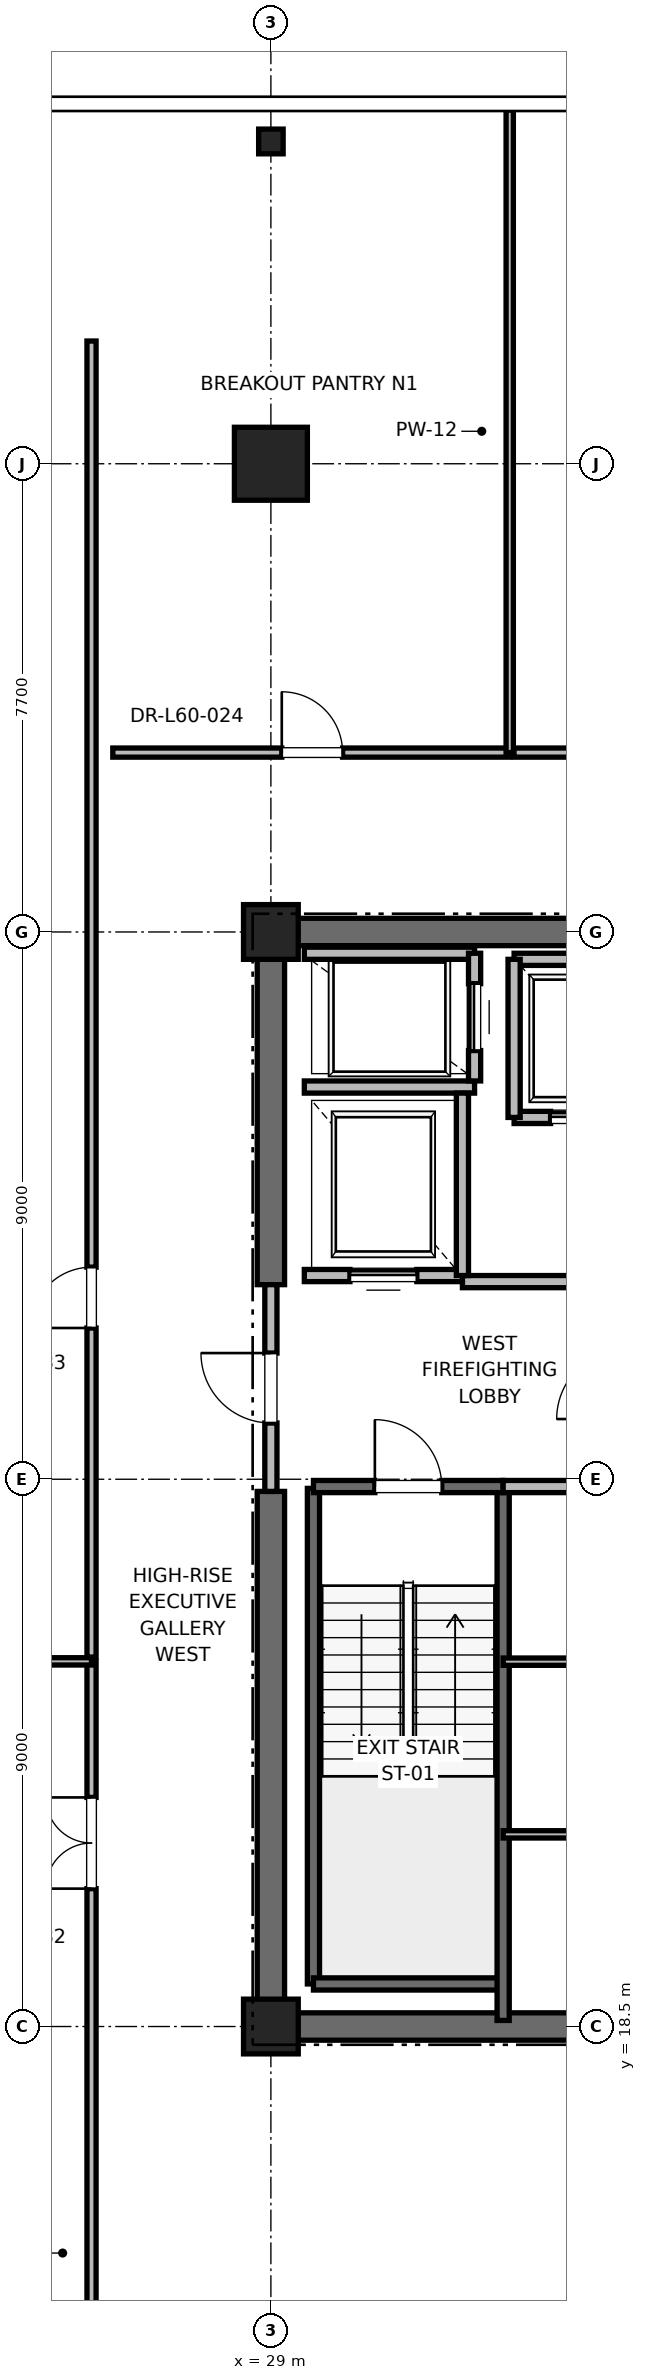
"""IFC4 building model, lengths in metres.
Left out: names, types, materials, properties, quantities, classifications, styles, units other than length and angle.
Written with IfcOpenShell. Run it as: python <this file> out.ifc"""

import sys

from ifc_helpers import new_model, si_unit, direction, frame, frame_2d, origin, origin_2d, place, context, subcontext, project, spatial, rectangle, i_section, extrude, element, fill, save


model = new_model("IFC4")
c1 = context("Model", 3, precision=1e-05, world=origin(), true_north=direction((0.0, 1.0)))
c2 = subcontext(c1, "Body", "Model", "MODEL_VIEW")
j1 = project(units=[si_unit("LENGTHUNIT", "METRE"), si_unit("PLANEANGLEUNIT", "RADIAN")], contexts=[c1])
p1 = place(None, origin())
s1 = spatial("IfcSite", under=j1, at=p1, CompositionType="ELEMENT")
p2 = place(p1, origin())
s2 = spatial("IfcBuilding", under=s1, at=p2, CompositionType="ELEMENT")
p3 = place(p2, frame((0.0, 0.0, 259.2)))
s3 = spatial("IfcBuildingStorey", under=s2, at=p3, CompositionType="ELEMENT", Elevation=259.2)
p4 = place(p3, frame((29.0, 44.2, 0.0), z_axis=(0.0, 0.0, 1.0), x_axis=(1.0, 0.0, 0.0)))
e1 = element("IfcColumn", 1, at=p4, inside=s3, PredefinedType="COLUMN", context=c2, shape_type="SweptSolid", body=[
    extrude(rectangle(XDim=1.2, YDim=1.2, at=origin_2d()), origin(), (0.0, 0.0, 1.0), 4.0),
])
p5 = place(p3, frame((29.0, 49.5, 0.0), z_axis=(0.0, 0.0, 1.0), x_axis=(1.0, 0.0, 0.0)))
e2 = element("IfcColumn", 2, at=p5, inside=s3, PredefinedType="COLUMN", context=c2, shape_type="SweptSolid", body=[
    extrude(i_section(OverallWidth=0.403, OverallDepth=0.406, WebThickness=0.027, FlangeThickness=0.043, FilletRadius=0.015, at=origin_2d()), origin(), (0.0, 0.0, 1.0), 4.0),
])
for number, where, z_axis, x_axis in (
    (3, (29.0, 18.5, 0.0), (0.0, 0.0, 1.0), (1.0, 0.0, 0.0)),
    (4, (29.0, 36.5, 0.0), (0.0, 0.0, 1.0), (1.0, 0.0, 0.0)),
):
    element("IfcColumn", number, at=place(p3, frame(where, z_axis=z_axis, x_axis=x_axis)), inside=s3, PredefinedType="PILASTER", context=c2, shape_type="SweptSolid", body=[
        extrude(rectangle(XDim=0.9, YDim=0.9, at=origin_2d()), origin(), (0.0, 0.0, 1.0), 4.0),
    ])
p6 = place(p3, frame((29.0, 18.5, 0.0), z_axis=(0.0, 0.0, 1.0), x_axis=(1.0, 0.0, 0.0)))
e5 = element("IfcWall", 5, at=p6, inside=s3, PredefinedType="SHEAR", context=c2, shape_type="SweptSolid", body=[
    extrude(rectangle(XDim=9.2, YDim=0.45, at=frame_2d((4.6, 0.0))), origin(), (0.0, 0.0, 1.0), 3.785),
])
p7 = place(p3, frame((29.0, 36.5, 0.0), z_axis=(0.0, 0.0, 1.0), x_axis=(1.0, 0.0, 0.0)))
e6 = element("IfcWall", 6, at=p7, inside=s3, PredefinedType="SHEAR", context=c2, shape_type="SweptSolid", body=[
    extrude(rectangle(XDim=5.8, YDim=0.45, at=frame_2d((2.9, 0.0))), origin(), (0.0, 0.0, 1.0), 3.785),
])
p8 = place(p3, frame((29.0, 18.5, 0.0), z_axis=(0.0, 0.0, 1.0), x_axis=(0.0, 1.0, 0.0)))
e7 = element("IfcWall", 7, at=p8, inside=s3, PredefinedType="SHEAR", context=c2, shape_type="SweptSolid", body=[
    extrude(rectangle(XDim=8.8, YDim=0.45, at=frame_2d((4.4, 0.0))), origin(), (0.0, 0.0, 1.0), 3.785),
])
p9 = place(p3, frame((29.0, 30.7, 0.0), z_axis=(0.0, 0.0, 1.0), x_axis=(0.0, 1.0, 0.0)))
e8 = element("IfcWall", 8, at=p9, inside=s3, PredefinedType="SHEAR", context=c2, shape_type="SweptSolid", body=[
    extrude(rectangle(XDim=5.8, YDim=0.45, at=frame_2d((2.9, 0.0))), origin(), (0.0, 0.0, 1.0), 3.785),
])
p10 = place(p3, frame((29.7, 19.2, 0.0), z_axis=(0.0, 0.0, 1.0), x_axis=(0.0, 1.0, 0.0)))
e9 = element("IfcWall", 9, at=p10, inside=s3, PredefinedType="SOLIDWALL", context=c2, shape_type="SweptSolid", body=[
    extrude(rectangle(XDim=8.15, YDim=0.2, at=frame_2d((4.075, 0.0))), origin(), (0.0, 0.0, 1.0), 3.785),
])
p11 = place(p3, frame((29.7, 19.2, 0.0), z_axis=(0.0, 0.0, 1.0), x_axis=(1.0, 0.0, 0.0)))
e10 = element("IfcWall", 10, at=p11, inside=s3, PredefinedType="SOLIDWALL", context=c2, shape_type="SweptSolid", body=[
    extrude(rectangle(XDim=3.12, YDim=0.2, at=frame_2d((1.56, 0.0))), origin(), (0.0, 0.0, 1.0), 3.785),
])
p12 = place(p3, frame((32.82, 18.6, 0.0), z_axis=(0.0, 0.0, 1.0), x_axis=(0.0, 1.0, 0.0)))
e11 = element("IfcWall", 11, at=p12, inside=s3, PredefinedType="SOLIDWALL", context=c2, shape_type="SweptSolid", body=[
    extrude(rectangle(XDim=8.78, YDim=0.2, at=frame_2d((4.39, 0.0))), origin(), (0.0, 0.0, 1.0), 3.785),
])
p13 = place(p3, frame((29.7, 27.38, 0.0), z_axis=(0.0, 0.0, 1.0), x_axis=(1.0, 0.0, 0.0)))
e12 = element("IfcWall", 12, at=p13, inside=s3, PredefinedType="SOLIDWALL", context=c2, shape_type="SweptSolid", body=[
    extrude(rectangle(XDim=3.12, YDim=0.2, at=frame_2d((1.56, 0.0))), origin(), (0.0, 0.0, 1.0), 3.785),
])
p14 = place(p13, frame((1.01, 0.0, 0.0)))
e13 = element("IfcOpeningElement", 13, at=p14, cuts=e12, PredefinedType="OPENING", context=c2, shape_type="SweptSolid", body=[
    extrude(rectangle(XDim=1.1, YDim=2.15, at=frame_2d((0.55, 1.075))), frame((0.0, 0.1, 0.0), z_axis=(0.0, -1.0, 0.0), x_axis=(1.0, 0.0, 0.0)), (0.0, 0.0, 1.0), 0.2),
])
p15 = place(p3, frame((29.0, 27.3, 0.0), z_axis=(0.0, 0.0, 1.0), x_axis=(0.0, 1.0, 0.0)))
e14 = element("IfcWall", 14, at=p15, inside=s3, PredefinedType="PARTITIONING", context=c2, shape_type="SweptSolid", body=[
    extrude(rectangle(XDim=3.4, YDim=0.2, at=frame_2d((1.7, 0.0))), origin(), (0.0, 0.0, 1.0), 2.865),
])
p16 = place(p15, frame((1.125, 0.0, 0.0)))
e15 = element("IfcOpeningElement", 15, at=p16, cuts=e14, PredefinedType="OPENING", context=c2, shape_type="SweptSolid", body=[
    extrude(rectangle(XDim=1.15, YDim=2.2, at=frame_2d((0.575, 1.1))), frame((0.0, 0.1, 0.0), z_axis=(0.0, -1.0, 0.0), x_axis=(1.0, 0.0, 0.0)), (0.0, 0.0, 1.0), 0.2),
])
p17 = place(p3, frame((32.82, 27.38, 0.0), z_axis=(0.0, 0.0, 1.0), x_axis=(1.0, 0.0, 0.0)))
e16 = element("IfcWall", 16, at=p17, inside=s3, PredefinedType="PARTITIONING", context=c2, shape_type="SweptSolid", body=[
    extrude(rectangle(XDim=5.62, YDim=0.2, at=frame_2d((2.81, 0.0))), origin(), (0.0, 0.0, 1.0), 3.785),
])
p18 = place(p3, frame((32.15, 30.75, 0.0), z_axis=(0.0, 0.0, 1.0), x_axis=(1.0, 0.0, 0.0)))
e17 = element("IfcWall", 17, at=p18, inside=s3, PredefinedType="PARTITIONING", context=c2, shape_type="SweptSolid", body=[
    extrude(rectangle(XDim=2.7, YDim=0.2, at=frame_2d((1.35, 0.0))), origin(), (0.0, 0.0, 1.0), 3.785),
])
p19 = place(p3, frame((29.55, 30.85, 0.0), z_axis=(0.0, 0.0, 1.0), x_axis=(1.0, 0.0, 0.0)))
e18 = element("IfcWall", 18, at=p19, inside=s3, PredefinedType="SOLIDWALL", context=c2, shape_type="SweptSolid", body=[
    extrude(rectangle(XDim=2.6, YDim=0.2, at=frame_2d((1.3, 0.0))), origin(), (0.0, 0.0, 1.0), 2.865),
])
p20 = place(p19, frame((0.75, 0.0, 0.0)))
e19 = element("IfcOpeningElement", 19, at=p20, cuts=e18, PredefinedType="OPENING", context=c2, shape_type="SweptSolid", body=[
    extrude(rectangle(XDim=1.1, YDim=2.2, at=frame_2d((0.55, 1.1))), frame((0.0, 0.1, 0.0), z_axis=(0.0, -1.0, 0.0), x_axis=(1.0, 0.0, 0.0)), (0.0, 0.0, 1.0), 0.2),
])
p21 = place(p3, frame((29.55, 33.95, 0.0), z_axis=(0.0, 0.0, 1.0), x_axis=(1.0, 0.0, 0.0)))
e20 = element("IfcWall", 20, at=p21, inside=s3, PredefinedType="SOLIDWALL", context=c2, shape_type="SweptSolid", body=[
    extrude(rectangle(XDim=2.8, YDim=0.2, at=frame_2d((1.4, 0.0))), origin(), (0.0, 0.0, 1.0), 3.785),
])
p22 = place(p3, frame((32.15, 30.85, 0.0), z_axis=(0.0, 0.0, 1.0), x_axis=(0.0, 1.0, 0.0)))
e21 = element("IfcWall", 21, at=p22, inside=s3, PredefinedType="SOLIDWALL", context=c2, shape_type="SweptSolid", body=[
    extrude(rectangle(XDim=3.0, YDim=0.2, at=frame_2d((1.5, 0.0))), origin(), (0.0, 0.0, 1.0), 3.785),
])
p23 = place(p3, frame((32.35, 36.15, 0.0), z_axis=(0.0, 0.0, 1.0), x_axis=(-1.0, 0.0, 0.0)))
e22 = element("IfcWall", 22, at=p23, inside=s3, PredefinedType="SOLIDWALL", context=c2, shape_type="SweptSolid", body=[
    extrude(rectangle(XDim=2.8, YDim=0.2, at=frame_2d((1.4, 0.0))), origin(), (0.0, 0.0, 1.0), 3.148),
])
p24 = place(p3, frame((32.35, 34.05, 0.0), z_axis=(0.0, 0.0, 1.0), x_axis=(0.0, 1.0, 0.0)))
e23 = element("IfcWall", 23, at=p24, inside=s3, PredefinedType="SOLIDWALL", context=c2, shape_type="SweptSolid", body=[
    extrude(rectangle(XDim=2.1, YDim=0.2, at=frame_2d((1.05, 0.0))), origin(), (0.0, 0.0, 1.0), 3.785),
])
p25 = place(p24, frame((0.5, 0.0, 0.0)))
e24 = element("IfcOpeningElement", 24, at=p25, cuts=e23, PredefinedType="OPENING", context=c2, shape_type="SweptSolid", body=[
    extrude(rectangle(XDim=1.1, YDim=2.2, at=frame_2d((0.55, 1.1))), frame((0.0, 0.1, 0.0), z_axis=(0.0, -1.0, 0.0), x_axis=(1.0, 0.0, 0.0)), (0.0, 0.0, 1.0), 0.2),
])
p26 = place(p3, frame((33.0, 33.45, 0.0), z_axis=(0.0, 0.0, 1.0), x_axis=(1.0, 0.0, 0.0)))
e25 = element("IfcWall", 25, at=p26, inside=s3, PredefinedType="SOLIDWALL", context=c2, shape_type="SweptSolid", body=[
    extrude(rectangle(XDim=2.3, YDim=0.2, at=frame_2d((1.15, 0.0))), origin(), (0.0, 0.0, 1.0), 3.785),
])
p27 = place(p26, frame((0.6, 0.0, 0.0)))
e26 = element("IfcOpeningElement", 26, at=p27, cuts=e25, PredefinedType="OPENING", context=c2, shape_type="SweptSolid", body=[
    extrude(rectangle(XDim=1.1, YDim=2.2, at=frame_2d((0.55, 1.1))), frame((0.0, 0.1, 0.0), z_axis=(0.0, -1.0, 0.0), x_axis=(1.0, 0.0, 0.0)), (0.0, 0.0, 1.0), 0.2),
])
p28 = place(p3, frame((35.3, 36.05, 0.0), z_axis=(0.0, 0.0, 1.0), x_axis=(-1.0, 0.0, 0.0)))
e27 = element("IfcWall", 27, at=p28, inside=s3, PredefinedType="SOLIDWALL", context=c2, shape_type="SweptSolid", body=[
    extrude(rectangle(XDim=2.3, YDim=0.2, at=frame_2d((1.15, 0.0))), origin(), (0.0, 0.0, 1.0), 2.865),
])
p29 = place(p3, frame((33.0, 36.05, 0.0), z_axis=(0.0, 0.0, 1.0), x_axis=(0.0, -1.0, 0.0)))
e28 = element("IfcWall", 28, at=p29, inside=s3, PredefinedType="SOLIDWALL", context=c2, shape_type="SweptSolid", body=[
    extrude(rectangle(XDim=2.6, YDim=0.2, at=frame_2d((1.3, 0.0))), origin(), (0.0, 0.0, 1.0), 3.785),
])
for number, where, z_axis, x_axis in (
    (29, (32.82, 21.66, 0.0), (0.0, 0.0, 1.0), (1.0, 0.0, 0.0)),
    (30, (32.82, 24.5, 0.0), (0.0, 0.0, 1.0), (1.0, 0.0, 0.0)),
):
    element("IfcWall", number, at=place(p3, frame(where, z_axis=z_axis, x_axis=x_axis)), inside=s3, PredefinedType="PARTITIONING", context=c2, shape_type="SweptSolid", body=[
        extrude(rectangle(XDim=5.23, YDim=0.12, at=frame_2d((2.615, 0.0))), origin(), (0.0, 0.0, 1.0), 2.85),
    ])
p30 = place(p3, frame((26.4, 39.45, 0.0), z_axis=(0.0, 0.0, 1.0), x_axis=(1.0, 0.0, 0.0)))
e31 = element("IfcWall", 31, at=p30, inside=s3, PredefinedType="PARTITIONING", context=c2, shape_type="SweptSolid", body=[
    extrude(rectangle(XDim=6.528, YDim=0.15, at=frame_2d((3.264, 0.0))), origin(), (0.0, 0.0, 1.0), 2.85),
])
p31 = place(p30, frame((2.779, 0.0, 0.0)))
e32 = element("IfcOpeningElement", 32, at=p31, cuts=e31, PredefinedType="OPENING", context=c2, shape_type="SweptSolid", body=[
    extrude(rectangle(XDim=1.0, YDim=2.15, at=frame_2d((0.5, 1.075))), frame((0.0, 0.075, 0.0), z_axis=(0.0, -1.0, 0.0), x_axis=(1.0, 0.0, 0.0)), (0.0, 0.0, 1.0), 0.15),
])
p32 = place(p3, frame((32.928, 39.45, 0.0), z_axis=(0.0, 0.0, 1.0), x_axis=(0.0, 1.0, 0.0)))
e33 = element("IfcWall", 33, at=p32, inside=s3, PredefinedType="PARTITIONING", context=c2, shape_type="SweptSolid", body=[
    extrude(rectangle(XDim=10.568, YDim=0.12, at=frame_2d((5.284, 0.0))), origin(), (0.0, 0.0, 1.0), 2.415),
])
p33 = place(p3, frame((32.998, 39.45, 0.0), z_axis=(0.0, 0.0, 1.0), x_axis=(1.0, 0.0, 0.0)))
e34 = element("IfcWall", 34, at=p33, inside=s3, PredefinedType="PARTITIONING", context=c2, shape_type="SweptSolid", body=[
    extrude(rectangle(XDim=8.09, YDim=0.15, at=frame_2d((4.045, 0.0))), origin(), (0.0, 0.0, 1.0), 2.85),
])
p34 = place(p33, frame((3.51, 0.0, 0.0)))
e35 = element("IfcOpeningElement", 35, at=p34, cuts=e34, PredefinedType="OPENING", context=c2, shape_type="SweptSolid", body=[
    extrude(rectangle(XDim=1.0, YDim=2.15, at=frame_2d((0.5, 1.075))), frame((0.0, 0.075, 0.0), z_axis=(0.0, -1.0, 0.0), x_axis=(1.0, 0.0, 0.0)), (0.0, 0.0, 1.0), 0.15),
])
p35 = place(p3, frame((26.05, 8.782, 0.0), z_axis=(0.0, 0.0, 1.0), x_axis=(0.0, 1.0, 0.0)))
e36 = element("IfcWall", 36, at=p35, inside=s3, PredefinedType="PARTITIONING", context=c2, shape_type="SweptSolid", body=[
    extrude(rectangle(XDim=15.723, YDim=0.15, at=frame_2d((7.862, 0.0))), origin(), (0.0, 0.0, 1.0), 2.85),
])
p36 = place(p35, frame((11.986, 0.0, 0.0)))
e37 = element("IfcOpeningElement", 37, at=p36, cuts=e36, PredefinedType="OPENING", context=c2, shape_type="SweptSolid", body=[
    extrude(rectangle(XDim=1.5, YDim=2.25, at=frame_2d((0.75, 1.125))), frame((0.0, 0.075, 0.0), z_axis=(0.0, -1.0, 0.0), x_axis=(1.0, 0.0, 0.0)), (0.0, 0.0, 1.0), 0.15),
])
p37 = place(p3, frame((13.733, 24.505, 0.0), z_axis=(0.0, 0.0, 1.0), x_axis=(1.0, 0.0, 0.0)))
e38 = element("IfcWall", 38, at=p37, inside=s3, PredefinedType="PARTITIONING", context=c2, shape_type="SweptSolid", body=[
    extrude(rectangle(XDim=12.317, YDim=0.12, at=frame_2d((6.158, 0.0))), origin(), (0.0, 0.0, 1.0), 2.85),
])
p38 = place(p3, frame((26.05, 24.575, 0.0), z_axis=(0.0, 0.0, 1.0), x_axis=(0.0, 1.0, 0.0)))
e39 = element("IfcWall", 39, at=p38, inside=s3, PredefinedType="PARTITIONING", context=c2, shape_type="SweptSolid", body=[
    extrude(rectangle(XDim=21.643, YDim=0.15, at=frame_2d((10.822, 0.0))), origin(), (0.0, 0.0, 1.0), 2.85),
])
p39 = place(p38, frame((5.412, 0.0, 0.0)))
e40 = element("IfcOpeningElement", 40, at=p39, cuts=e39, PredefinedType="OPENING", context=c2, shape_type="SweptSolid", body=[
    extrude(rectangle(XDim=1.0, YDim=2.15, at=frame_2d((0.5, 1.075))), frame((0.0, 0.075, 0.0), z_axis=(0.0, -1.0, 0.0), x_axis=(1.0, 0.0, 0.0)), (0.0, 0.0, 1.0), 0.15),
])
p40 = place(p14, origin())
e41 = element("IfcDoor", 41, at=p40, inside=s3, OperationType="SINGLE_SWING_LEFT", PredefinedType="DOOR", context=c2, shape_type="SweptSolid", body=[
    extrude(rectangle(XDim=1.1, YDim=2.15, at=frame_2d((0.55, 1.075))), frame((0.0, 0.025, 0.0), z_axis=(0.0, -1.0, 0.0), x_axis=(1.0, 0.0, 0.0)), (0.0, 0.0, 1.0), 0.05),
])
fill(e13, e41)
p41 = place(p16, origin())
e42 = element("IfcDoor", 42, at=p41, inside=s3, OperationType="SINGLE_SWING_RIGHT", PredefinedType="DOOR", context=c2, shape_type="SweptSolid", body=[
    extrude(rectangle(XDim=1.15, YDim=2.2, at=frame_2d((0.575, 1.1))), frame((0.0, 0.025, 0.0), z_axis=(0.0, -1.0, 0.0), x_axis=(1.0, 0.0, 0.0)), (0.0, 0.0, 1.0), 0.05),
])
fill(e15, e42)
p42 = place(p20, origin())
e43 = element("IfcDoor", 43, at=p42, inside=s3, OperationType="SLIDING_TO_RIGHT", PredefinedType="DOOR", context=c2, shape_type="SweptSolid", body=[
    extrude(rectangle(XDim=1.1, YDim=2.2, at=frame_2d((0.55, 1.1))), frame((0.0, 0.025, 0.0), z_axis=(0.0, -1.0, 0.0), x_axis=(1.0, 0.0, 0.0)), (0.0, 0.0, 1.0), 0.05),
])
fill(e19, e43)
p43 = place(p25, origin())
e44 = element("IfcDoor", 44, at=p43, inside=s3, OperationType="SLIDING_TO_RIGHT", PredefinedType="DOOR", context=c2, shape_type="SweptSolid", body=[
    extrude(rectangle(XDim=1.1, YDim=2.2, at=frame_2d((0.55, 1.1))), frame((0.0, 0.025, 0.0), z_axis=(0.0, -1.0, 0.0), x_axis=(1.0, 0.0, 0.0)), (0.0, 0.0, 1.0), 0.05),
])
fill(e24, e44)
p44 = place(p27, origin())
e45 = element("IfcDoor", 45, at=p44, inside=s3, OperationType="SLIDING_TO_RIGHT", PredefinedType="DOOR", context=c2, shape_type="SweptSolid", body=[
    extrude(rectangle(XDim=1.1, YDim=2.2, at=frame_2d((0.55, 1.1))), frame((0.0, 0.025, 0.0), z_axis=(0.0, -1.0, 0.0), x_axis=(1.0, 0.0, 0.0)), (0.0, 0.0, 1.0), 0.05),
])
fill(e26, e45)
p45 = place(p31, origin())
e46 = element("IfcDoor", 46, at=p45, inside=s3, OperationType="SINGLE_SWING_LEFT", PredefinedType="DOOR", context=c2, shape_type="SweptSolid", body=[
    extrude(rectangle(XDim=1.0, YDim=2.15, at=frame_2d((0.5, 1.075))), frame((0.0, 0.025, 0.0), z_axis=(0.0, -1.0, 0.0), x_axis=(1.0, 0.0, 0.0)), (0.0, 0.0, 1.0), 0.05),
])
fill(e32, e46)
p46 = place(p36, origin())
e47 = element("IfcDoor", 47, at=p46, inside=s3, OperationType="DOUBLE_DOOR_SINGLE_SWING", PredefinedType="DOOR", context=c2, shape_type="SweptSolid", body=[
    extrude(rectangle(XDim=1.5, YDim=2.25, at=frame_2d((0.75, 1.125))), frame((0.0, 0.025, 0.0), z_axis=(0.0, -1.0, 0.0), x_axis=(1.0, 0.0, 0.0)), (0.0, 0.0, 1.0), 0.05),
])
fill(e37, e47)
p47 = place(p39, origin())
e48 = element("IfcDoor", 48, at=p47, inside=s3, OperationType="SINGLE_SWING_LEFT", PredefinedType="DOOR", context=c2, shape_type="SweptSolid", body=[
    extrude(rectangle(XDim=1.0, YDim=2.15, at=frame_2d((0.5, 1.075))), frame((0.0, 0.025, 0.0), z_axis=(0.0, -1.0, 0.0), x_axis=(1.0, 0.0, 0.0)), (0.0, 0.0, 1.0), 0.05),
])
fill(e40, e48)
save(model, sys.argv[1])
